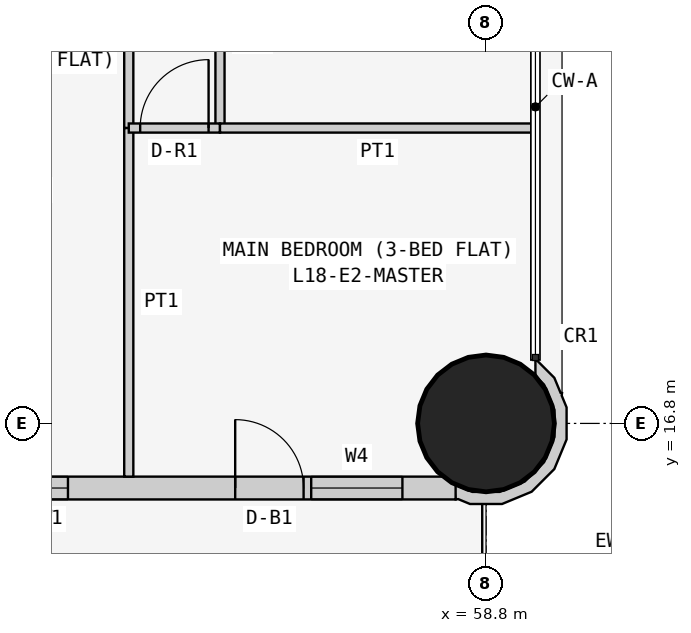
"""IFC4 building model, lengths in metres.
Left out: names, types, materials, properties, quantities, classifications, styles, units other than length and angle.
Written with IfcOpenShell. Run it as: python <this file> out.ifc"""

import sys

from ifc_helpers import new_model, si_unit, direction, frame, frame_2d, origin, origin_2d, place, context, subcontext, project, spatial, polyline, rectangle, circle, outline, extrude, element, fill, save


model = new_model("IFC4")
c1 = context("Model", 3, precision=1e-05, world=origin(), true_north=direction((0.0, 1.0)))
c2 = subcontext(c1, "Body", "Model", "MODEL_VIEW")
j1 = project(units=[si_unit("LENGTHUNIT", "METRE"), si_unit("PLANEANGLEUNIT", "RADIAN")], contexts=[c1])
p1 = place(None, origin())
s1 = spatial("IfcSite", under=j1, at=p1, CompositionType="ELEMENT")
p2 = place(p1, origin())
s2 = spatial("IfcBuilding", under=s1, at=p2, CompositionType="ELEMENT")
p3 = place(p2, frame((0.0, 0.0, 74.1)))
s3 = spatial("IfcBuildingStorey", under=s2, at=p3, CompositionType="ELEMENT", Elevation=74.1)
p4 = place(p3, frame((58.8, 16.8, 0.0), z_axis=(0.0, 0.0, 1.0), x_axis=(1.0, 0.0, 0.0)))
e1 = element("IfcColumn", 1, at=p4, inside=s3, PredefinedType="COLUMN", context=c2, shape_type="SweptSolid", body=[
    extrude(circle(Radius=0.9, at=origin_2d()), origin(), (0.0, 0.0, 1.0), 3.6),
])
p5 = place(p3, frame((43.0, 15.95, 0.0), z_axis=(0.0, 0.0, 1.0), x_axis=(1.0, 0.0, 0.0)))
e2 = element("IfcWall", 2, at=p5, inside=s3, PredefinedType="SOLIDWALL", context=c2, shape_type="SweptSolid", body=[
    extrude(rectangle(XDim=15.4, YDim=0.3, at=frame_2d((7.7, 0.0))), origin(), (0.0, 0.0, 1.0), 3.45),
])
p6 = place(p5, frame((1.2, 0.0, 0.9)))
e3 = element("IfcOpeningElement", 3, at=p6, cuts=e2, PredefinedType="OPENING", context=c2, shape_type="SweptSolid", body=[
    extrude(rectangle(XDim=1.8, YDim=1.5, at=frame_2d((0.9, 0.75))), frame((0.0, 0.16, 0.0), z_axis=(0.0, -1.0, 0.0), x_axis=(1.0, 0.0, 0.0)), (0.0, 0.0, 1.0), 0.32),
])
p7 = place(p5, frame((4.95, 0.0, 1.5)))
e4 = element("IfcOpeningElement", 4, at=p7, cuts=e2, PredefinedType="OPENING", context=c2, shape_type="SweptSolid", body=[
    extrude(rectangle(XDim=0.9, YDim=0.7, at=frame_2d((0.45, 0.35))), frame((0.0, 0.16, 0.0), z_axis=(0.0, -1.0, 0.0), x_axis=(1.0, 0.0, 0.0)), (0.0, 0.0, 1.0), 0.32),
])
p8 = place(p5, frame((8.5, 0.0, 0.9)))
e5 = element("IfcOpeningElement", 5, at=p8, cuts=e2, PredefinedType="OPENING", context=c2, shape_type="SweptSolid", body=[
    extrude(rectangle(XDim=1.8, YDim=1.5, at=frame_2d((0.9, 0.75))), frame((0.0, 0.16, 0.0), z_axis=(0.0, -1.0, 0.0), x_axis=(1.0, 0.0, 0.0)), (0.0, 0.0, 1.0), 0.32),
])
p9 = place(p5, frame((12.5, 0.0, 0.0)))
e6 = element("IfcOpeningElement", 6, at=p9, cuts=e2, PredefinedType="OPENING", context=c2, shape_type="SweptSolid", body=[
    extrude(rectangle(XDim=0.9, YDim=2.4, at=frame_2d((0.45, 1.2))), frame((0.0, 0.16, 0.0), z_axis=(0.0, -1.0, 0.0), x_axis=(1.0, 0.0, 0.0)), (0.0, 0.0, 1.0), 0.32),
])
p10 = place(p5, frame((13.5, 0.0, 0.9)))
e7 = element("IfcOpeningElement", 7, at=p10, cuts=e2, PredefinedType="OPENING", context=c2, shape_type="SweptSolid", body=[
    extrude(rectangle(XDim=1.2, YDim=1.5, at=frame_2d((0.6, 0.75))), frame((0.0, 0.16, 0.0), z_axis=(0.0, -1.0, 0.0), x_axis=(1.0, 0.0, 0.0)), (0.0, 0.0, 1.0), 0.32),
])
p11 = place(p3, frame((58.436, 15.89, 0.0), z_axis=(0.0, 0.0, 1.0), x_axis=(0.926129809145, -0.377204953059, 0.0)))
e8 = element("IfcWall", 8, at=p11, inside=s3, PredefinedType="SOLIDWALL", context=c2, shape_type="SweptSolid", body=[
    extrude(outline(polyline([(0.769, 1.728), (0.75, 1.723), (0.6, 1.875), (0.295, 2.004), (0.281, 1.998), (0.36, 1.803), (0.509, 1.741), (0.761, 1.486), (0.896, 1.154), (0.894, 0.795), (0.755, 0.465), (0.5, 0.213), (0.168, 0.078), (-0.1, 0.08), (0.0, -0.097), (0.03, -0.08), (0.198, -0.081), (0.589, 0.078), (0.889, 0.374), (1.052, 0.763), (1.055, 1.185), (0.896, 1.575), (0.778, 1.695), (0.769, 1.728)])), origin(), (0.0, 0.0, 1.0), 3.45),
])
p12 = place(p3, frame((54.1, 22.971, 0.0), z_axis=(0.0, 0.0, 1.0), x_axis=(0.0, -1.0, 0.0)))
e9 = element("IfcWall", 9, at=p12, inside=s3, PredefinedType="PARTITIONING", context=c2, shape_type="SweptSolid", body=[
    extrude(rectangle(XDim=2.285, YDim=0.12, at=frame_2d((1.143, 0.0))), origin(), (0.0, 0.0, 1.0), 3.45),
])
p13 = place(p3, frame((54.1, 20.686, 0.0), z_axis=(0.0, 0.0, 1.0), x_axis=(0.0, -1.0, 0.0)))
e10 = element("IfcWall", 10, at=p13, inside=s3, PredefinedType="PARTITIONING", context=c2, shape_type="SweptSolid", body=[
    extrude(rectangle(XDim=4.586, YDim=0.12, at=frame_2d((2.293, 0.0))), origin(), (0.0, 0.0, 1.0), 3.45),
])
p14 = place(p3, frame((55.3, 22.971, 0.0), z_axis=(0.0, 0.0, 1.0), x_axis=(0.0, -1.0, 0.0)))
e11 = element("IfcWall", 11, at=p14, inside=s3, PredefinedType="PARTITIONING", context=c2, shape_type="SweptSolid", body=[
    extrude(rectangle(XDim=2.285, YDim=0.12, at=frame_2d((1.143, 0.0))), origin(), (0.0, 0.0, 1.0), 3.45),
])
p15 = place(p3, frame((55.3, 20.686, 0.0), z_axis=(0.0, 0.0, 1.0), x_axis=(-1.0, 0.0, 0.0)))
e12 = element("IfcWall", 12, at=p15, inside=s3, PredefinedType="PARTITIONING", context=c2, shape_type="SweptSolid", body=[
    extrude(rectangle(XDim=1.2, YDim=0.12, at=frame_2d((0.6, 0.0))), origin(), (0.0, 0.0, 1.0), 3.45),
])
p16 = place(p15, frame((0.15, 0.0, 0.0)))
e13 = element("IfcOpeningElement", 13, at=p16, cuts=e12, PredefinedType="OPENING", context=c2, shape_type="SweptSolid", body=[
    extrude(rectangle(XDim=0.9, YDim=2.1, at=frame_2d((0.45, 1.05))), frame((0.0, 0.07, 0.0), z_axis=(0.0, -1.0, 0.0), x_axis=(1.0, 0.0, 0.0)), (0.0, 0.0, 1.0), 0.14),
])
p17 = place(p3, frame((59.45, 20.686, 0.0), z_axis=(0.0, 0.0, 1.0), x_axis=(-1.0, 0.0, 0.0)))
e14 = element("IfcWall", 14, at=p17, inside=s3, PredefinedType="PARTITIONING", context=c2, shape_type="SweptSolid", body=[
    extrude(rectangle(XDim=4.15, YDim=0.12, at=frame_2d((2.075, 0.0))), origin(), (0.0, 0.0, 1.0), 3.45),
])
p18 = place(p8, origin())
e15 = element("IfcWindow", 15, at=p18, inside=s3, PartitioningType="SINGLE_PANEL", PredefinedType="WINDOW", context=c2, shape_type="SweptSolid", body=[
    extrude(rectangle(XDim=1.8, YDim=1.5, at=frame_2d((0.9, 0.75))), frame((0.0, 0.03, 0.0), z_axis=(0.0, -1.0, 0.0), x_axis=(1.0, 0.0, 0.0)), (0.0, 0.0, 1.0), 0.06),
])
fill(e5, e15)
p19 = place(p9, origin())
e16 = element("IfcDoor", 16, at=p19, inside=s3, OperationType="SINGLE_SWING_LEFT", PredefinedType="DOOR", context=c2, shape_type="SweptSolid", body=[
    extrude(rectangle(XDim=0.9, YDim=2.4, at=frame_2d((0.45, 1.2))), frame((0.0, 0.025, 0.0), z_axis=(0.0, -1.0, 0.0), x_axis=(1.0, 0.0, 0.0)), (0.0, 0.0, 1.0), 0.05),
])
fill(e6, e16)
p20 = place(p10, origin())
e17 = element("IfcWindow", 17, at=p20, inside=s3, PartitioningType="SINGLE_PANEL", PredefinedType="WINDOW", context=c2, shape_type="SweptSolid", body=[
    extrude(rectangle(XDim=1.2, YDim=1.5, at=frame_2d((0.6, 0.75))), frame((0.0, 0.03, 0.0), z_axis=(0.0, -1.0, 0.0), x_axis=(1.0, 0.0, 0.0)), (0.0, 0.0, 1.0), 0.06),
])
fill(e7, e17)
p21 = place(p16, frame((0.9, 0.0, 0.0), z_axis=(0.0, 0.0, 1.0), x_axis=(-1.0, 0.0, 0.0)))
e18 = element("IfcDoor", 18, at=p21, inside=s3, OperationType="SINGLE_SWING_RIGHT", PredefinedType="DOOR", context=c2, shape_type="SweptSolid", body=[
    extrude(rectangle(XDim=0.9, YDim=2.1, at=frame_2d((0.45, 1.05))), frame((0.0, 0.025, 0.0), z_axis=(0.0, -1.0, 0.0), x_axis=(1.0, 0.0, 0.0)), (0.0, 0.0, 1.0), 0.05),
])
fill(e13, e18)
save(model, sys.argv[1])
